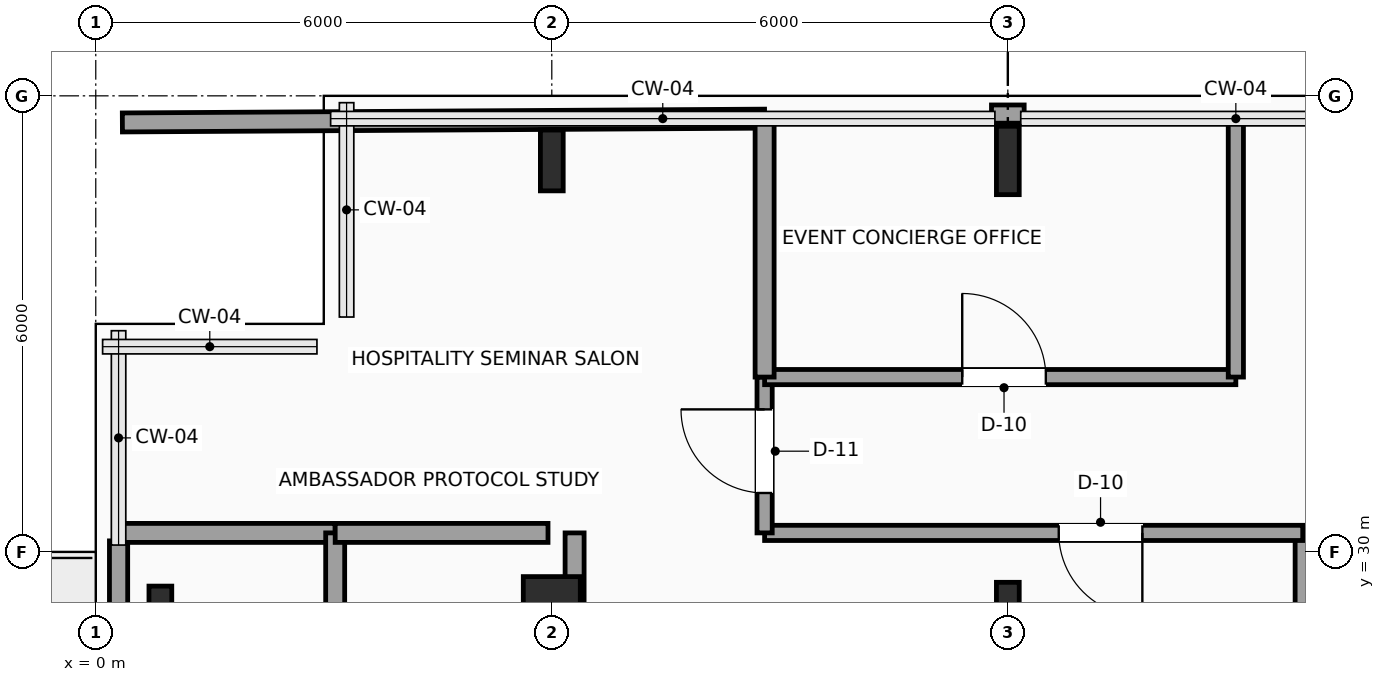
"""IFC4 building model, lengths in metres.
Left out: names, types, materials, properties, quantities, classifications, styles, units other than length and angle.
Written with IfcOpenShell. Run it as: python <this file> out.ifc"""

import sys

from ifc_helpers import new_model, si_unit, direction, frame, frame_2d, origin, origin_2d, place, context, subcontext, project, spatial, rectangle, i_section, extrude, element, fill, save


model = new_model("IFC4")
c1 = context("Model", 3, precision=1e-05, world=origin(), true_north=direction((0.0, 1.0)))
c2 = subcontext(c1, "Body", "Model", "MODEL_VIEW")
j1 = project(units=[si_unit("LENGTHUNIT", "METRE"), si_unit("PLANEANGLEUNIT", "RADIAN")], contexts=[c1])
p1 = place(None, origin())
s1 = spatial("IfcSite", under=j1, at=p1, CompositionType="ELEMENT")
p2 = place(p1, origin())
s2 = spatial("IfcBuilding", under=s1, at=p2, CompositionType="ELEMENT")
p3 = place(p2, frame((0.0, 0.0, 184.2)))
s3 = spatial("IfcBuildingStorey", under=s2, at=p3, CompositionType="ELEMENT", Elevation=184.2)
p4 = place(p3, frame((0.85, 29.15, 0.0), z_axis=(0.0, 0.0, 1.0), x_axis=(1.0, 0.0, 0.0)))
e1 = element("IfcColumn", 1, at=p4, inside=s3, PredefinedType="COLUMN", context=c2, shape_type="SweptSolid", body=[
    extrude(i_section(OverallWidth=0.3, OverallDepth=0.8, WebThickness=0.018, FlangeThickness=0.033, FilletRadius=0.03, at=origin_2d()), origin(), (0.0, 0.0, 1.0), 3.75),
])
p5 = place(p3, frame((6.0, 29.15, 0.0), z_axis=(0.0, 0.0, 1.0), x_axis=(1.0, 0.0, 0.0)))
e2 = element("IfcColumn", 2, at=p5, inside=s3, PredefinedType="COLUMN", context=c2, shape_type="SweptSolid", body=[
    extrude(rectangle(XDim=0.75, YDim=1.05, at=origin_2d()), origin(), (0.0, 0.0, 1.0), 3.75),
])
p6 = place(p3, frame((6.0, 35.15, 0.0), z_axis=(0.0, 0.0, 1.0), x_axis=(1.0, 0.0, 0.0)))
e3 = element("IfcColumn", 3, at=p6, inside=s3, PredefinedType="COLUMN", context=c2, shape_type="SweptSolid", body=[
    extrude(i_section(OverallWidth=0.3, OverallDepth=0.8, WebThickness=0.018, FlangeThickness=0.033, FilletRadius=0.03, at=origin_2d()), origin(), (0.0, 0.0, 1.0), 3.75),
])
for number, where, z_axis, x_axis in (
    (4, (12.0, 29.15, 0.0), (0.0, 0.0, 1.0), (1.0, 0.0, 0.0)),
    (5, (12.0, 35.15, 0.0), (0.0, 0.0, 1.0), (1.0, 0.0, 0.0)),
):
    element("IfcColumn", number, at=place(p3, frame(where, z_axis=z_axis, x_axis=x_axis)), inside=s3, PredefinedType="COLUMN", context=c2, shape_type="SweptSolid", body=[
        extrude(i_section(OverallWidth=0.3, OverallDepth=0.9, WebThickness=0.019, FlangeThickness=0.035, FilletRadius=0.03, at=origin_2d()), origin(), (0.0, 0.0, 1.0), 3.75),
    ])
p7 = place(p3, frame((0.3, 20.855, 0.0), z_axis=(0.0, 0.0, 1.0), x_axis=(0.0, 1.0, 0.0)))
e6 = element("IfcWall", 6, at=p7, inside=s3, PredefinedType="SOLIDWALL", context=c2, shape_type="SweptSolid", body=[
    extrude(rectangle(XDim=9.29, YDim=0.24, at=frame_2d((4.645, 0.0))), origin(), (0.0, 0.0, 1.0), 3.54),
])
p8 = place(p7, frame((3.945, 0.0, 0.0)))
e7 = element("IfcOpeningElement", 7, at=p8, cuts=e6, PredefinedType="OPENING", context=c2, shape_type="SweptSolid", body=[
    extrude(rectangle(XDim=1.05, YDim=2.2, at=frame_2d((0.525, 1.1))), frame((0.0, 0.13, 0.0), z_axis=(0.0, -1.0, 0.0), x_axis=(1.0, 0.0, 0.0)), (0.0, 0.0, 1.0), 0.26),
])
p9 = place(p7, frame((5.345, 0.0, 0.85)))
e8 = element("IfcOpeningElement", 8, at=p9, cuts=e6, PredefinedType="OPENING", context=c2, shape_type="SweptSolid", body=[
    extrude(rectangle(XDim=2.1, YDim=2.2, at=frame_2d((1.05, 1.1))), frame((0.0, 0.13, 0.0), z_axis=(0.0, -1.0, 0.0), x_axis=(1.0, 0.0, 0.0)), (0.0, 0.0, 1.0), 0.26),
])
p10 = place(p3, frame((11.785, 35.76, 0.0), z_axis=(0.0, 0.0, 1.0), x_axis=(1.0, 0.0, 0.0)))
e9 = element("IfcWall", 9, at=p10, inside=s3, PredefinedType="SOLIDWALL", context=c2, shape_type="SweptSolid", body=[
    extrude(rectangle(XDim=0.43, YDim=0.24, at=frame_2d((0.215, 0.0))), origin(), (0.0, 0.0, 1.0), 3.54),
])
p11 = place(p3, frame((15.88, 27.58, 0.0), z_axis=(0.0, 0.0, 1.0), x_axis=(0.0, 1.0, 0.0)))
e10 = element("IfcWall", 10, at=p11, inside=s3, PredefinedType="SOLIDWALL", context=c2, shape_type="SweptSolid", body=[
    extrude(rectangle(XDim=2.67, YDim=0.2, at=frame_2d((1.335, 0.0))), origin(), (0.0, 0.0, 1.0), 3.54),
])
p12 = place(p3, frame((15.88, 30.25, 0.0), z_axis=(0.0, 0.0, 1.0), x_axis=(-1.0, 0.0, 0.0)))
e11 = element("IfcWall", 11, at=p12, inside=s3, PredefinedType="SOLIDWALL", context=c2, shape_type="SweptSolid", body=[
    extrude(rectangle(XDim=7.08, YDim=0.2, at=frame_2d((3.54, 0.0))), origin(), (0.0, 0.0, 1.0), 3.54),
])
p13 = place(p12, frame((2.11, 0.0, 0.0)))
e12 = element("IfcOpeningElement", 12, at=p13, cuts=e11, PredefinedType="OPENING", context=c2, shape_type="SweptSolid", body=[
    extrude(rectangle(XDim=1.1, YDim=2.25, at=frame_2d((0.55, 1.125))), frame((0.0, 0.11, 0.0), z_axis=(0.0, -1.0, 0.0), x_axis=(1.0, 0.0, 0.0)), (0.0, 0.0, 1.0), 0.22),
])
p14 = place(p3, frame((8.8, 30.25, 0.0), z_axis=(0.0, 0.0, 1.0), x_axis=(0.0, 1.0, 0.0)))
e13 = element("IfcWall", 13, at=p14, inside=s3, PredefinedType="SOLIDWALL", context=c2, shape_type="SweptSolid", body=[
    extrude(rectangle(XDim=2.05, YDim=0.2, at=frame_2d((1.025, 0.0))), origin(), (0.0, 0.0, 1.0), 3.54),
])
p15 = place(p14, frame((0.525, 0.0, 0.0)))
e14 = element("IfcOpeningElement", 14, at=p15, cuts=e13, PredefinedType="OPENING", context=c2, shape_type="SweptSolid", body=[
    extrude(rectangle(XDim=1.1, YDim=2.25, at=frame_2d((0.55, 1.125))), frame((0.0, 0.11, 0.0), z_axis=(0.0, -1.0, 0.0), x_axis=(1.0, 0.0, 0.0)), (0.0, 0.0, 1.0), 0.22),
])
p16 = place(p3, frame((8.8, 32.3, 0.0), z_axis=(0.0, 0.0, 1.0), x_axis=(1.0, 0.0, 0.0)))
e15 = element("IfcWall", 15, at=p16, inside=s3, PredefinedType="SOLIDWALL", context=c2, shape_type="SweptSolid", body=[
    extrude(rectangle(XDim=6.2, YDim=0.2, at=frame_2d((3.1, 0.0))), origin(), (0.0, 0.0, 1.0), 3.132),
])
p17 = place(p16, frame((2.6, 0.0, 0.0)))
e16 = element("IfcOpeningElement", 16, at=p17, cuts=e15, PredefinedType="OPENING", context=c2, shape_type="SweptSolid", body=[
    extrude(rectangle(XDim=1.1, YDim=2.25, at=frame_2d((0.55, 1.125))), frame((0.0, 0.11, 0.0), z_axis=(0.0, -1.0, 0.0), x_axis=(1.0, 0.0, 0.0)), (0.0, 0.0, 1.0), 0.22),
])
p18 = place(p3, frame((15.0, 32.3, 0.0), z_axis=(0.0, 0.0, 1.0), x_axis=(0.0, 1.0, 0.0)))
e17 = element("IfcWall", 17, at=p18, inside=s3, PredefinedType="SOLIDWALL", context=c2, shape_type="SweptSolid", body=[
    extrude(rectangle(XDim=3.4, YDim=0.2, at=frame_2d((1.7, 0.0))), origin(), (0.0, 0.0, 1.0), 3.54),
])
p19 = place(p3, frame((0.3, 30.25, 0.0), z_axis=(0.0, 0.0, 1.0), x_axis=(1.0, 0.0, 0.0)))
e18 = element("IfcWall", 18, at=p19, inside=s3, PredefinedType="PARTITIONING", context=c2, shape_type="SweptSolid", body=[
    extrude(rectangle(XDim=2.85, YDim=0.25, at=frame_2d((1.425, 0.0))), origin(), (0.0, 0.0, 1.0), 3.54),
])
p20 = place(p3, frame((3.15, 18.0, 0.0), z_axis=(0.0, 0.0, 1.0), x_axis=(0.0, 1.0, 0.0)))
e19 = element("IfcWall", 19, at=p20, inside=s3, PredefinedType="PARTITIONING", context=c2, shape_type="SweptSolid", body=[
    extrude(rectangle(XDim=12.25, YDim=0.25, at=frame_2d((6.125, 0.0))), origin(), (0.0, 0.0, 1.0), 3.54),
])
p21 = place(p3, frame((3.15, 30.25, 0.0), z_axis=(0.0, 0.0, 1.0), x_axis=(1.0, 0.0, 0.0)))
e20 = element("IfcWall", 20, at=p21, inside=s3, PredefinedType="PARTITIONING", context=c2, shape_type="SweptSolid", body=[
    extrude(rectangle(XDim=2.8, YDim=0.25, at=frame_2d((1.4, 0.0))), origin(), (0.0, 0.0, 1.0), 3.54),
])
p22 = place(p3, frame((6.3, 27.65, 0.0), z_axis=(0.0, 0.0, 1.0), x_axis=(0.0, 1.0, 0.0)))
e21 = element("IfcWall", 21, at=p22, inside=s3, PredefinedType="PARTITIONING", context=c2, shape_type="SweptSolid", body=[
    extrude(rectangle(XDim=2.6, YDim=0.25, at=frame_2d((1.3, 0.0))), origin(), (0.0, 0.0, 1.0), 3.132),
])
p23 = place(p3, frame((0.35, 35.65, 0.0), z_axis=(0.0, 0.0, 1.0), x_axis=(0.99998245966, 0.005922868574, 0.0)))
e22 = element("IfcWall", 22, at=p23, inside=s3, PredefinedType="PARTITIONING", context=c2, shape_type="SweptSolid", body=[
    extrude(rectangle(XDim=8.45, YDim=0.25, at=frame_2d((4.225, 0.0))), origin(), (0.0, 0.0, 1.0), 3.54),
])
p24 = place(p3, frame((8.8, 32.3, 0.0), z_axis=(0.0, 0.0, 1.0), x_axis=(0.0, 1.0, 0.0)))
e23 = element("IfcWall", 23, at=p24, inside=s3, PredefinedType="PARTITIONING", context=c2, shape_type="SweptSolid", body=[
    extrude(rectangle(XDim=3.4, YDim=0.25, at=frame_2d((1.7, 0.0))), origin(), (0.0, 0.0, 1.0), 3.54),
])
p25 = place(p13, origin())
e24 = element("IfcDoor", 24, at=p25, inside=s3, OperationType="SINGLE_SWING_LEFT", PredefinedType="DOOR", context=c2, shape_type="SweptSolid", body=[
    extrude(rectangle(XDim=1.1, YDim=2.25, at=frame_2d((0.55, 1.125))), frame((0.0, 0.025, 0.0), z_axis=(0.0, -1.0, 0.0), x_axis=(1.0, 0.0, 0.0)), (0.0, 0.0, 1.0), 0.05),
])
fill(e12, e24)
p26 = place(p15, origin())
e25 = element("IfcDoor", 25, at=p26, inside=s3, OperationType="SINGLE_SWING_RIGHT", PredefinedType="DOOR", context=c2, shape_type="SweptSolid", body=[
    extrude(rectangle(XDim=1.1, YDim=2.25, at=frame_2d((0.55, 1.125))), frame((0.0, 0.025, 0.0), z_axis=(0.0, -1.0, 0.0), x_axis=(1.0, 0.0, 0.0)), (0.0, 0.0, 1.0), 0.05),
])
fill(e14, e25)
p27 = place(p17, origin())
e26 = element("IfcDoor", 26, at=p27, inside=s3, OperationType="SINGLE_SWING_LEFT", PredefinedType="DOOR", context=c2, shape_type="SweptSolid", body=[
    extrude(rectangle(XDim=1.1, YDim=2.25, at=frame_2d((0.55, 1.125))), frame((0.0, 0.025, 0.0), z_axis=(0.0, -1.0, 0.0), x_axis=(1.0, 0.0, 0.0)), (0.0, 0.0, 1.0), 0.05),
])
fill(e16, e26)
save(model, sys.argv[1])
